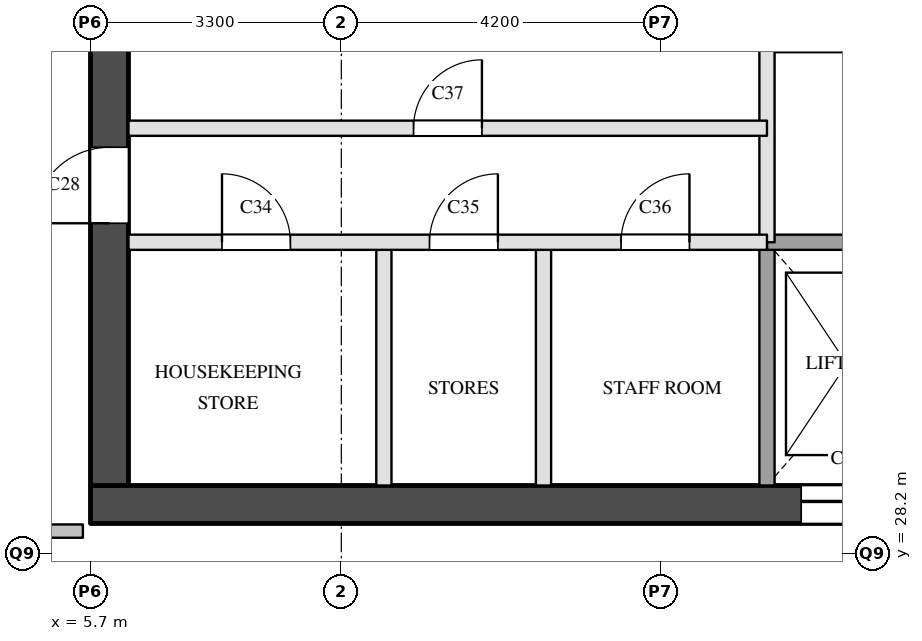
"""IFC4 building model, lengths in metres.
Left out: names, types, materials, properties, quantities, classifications, styles, units other than length and angle.
Written with IfcOpenShell. Run it as: python <this file> out.ifc"""

import sys

from ifc_helpers import new_model, si_unit, direction, frame, frame_2d, origin, place, context, subcontext, project, spatial, rectangle, extrude, element, fill, save


model = new_model("IFC4")
c1 = context("Model", 3, precision=1e-05, world=origin(), true_north=direction((0.0, 1.0)))
c2 = subcontext(c1, "Body", "Model", "MODEL_VIEW")
j1 = project(units=[si_unit("LENGTHUNIT", "METRE"), si_unit("PLANEANGLEUNIT", "RADIAN")], contexts=[c1])
p1 = place(None, origin())
s1 = spatial("IfcSite", under=j1, at=p1, CompositionType="ELEMENT")
p2 = place(p1, origin())
s2 = spatial("IfcBuilding", under=s1, at=p2, CompositionType="ELEMENT")
p3 = place(p2, frame((0.0, 0.0, 158.3)))
s3 = spatial("IfcBuildingStorey", under=s2, at=p3, CompositionType="ELEMENT", Elevation=158.3)
p4 = place(p3, frame((5.7, 28.85, 0.0), z_axis=(0.0, 0.0, 1.0), x_axis=(1.0, 0.0, 0.0)))
e1 = element("IfcWall", 1, at=p4, inside=s3, PredefinedType="SHEAR", context=c2, shape_type="SweptSolid", body=[
    extrude(rectangle(XDim=12.2, YDim=0.5, at=frame_2d((6.1, 0.0))), origin(), (0.0, 0.0, 1.0), 3.6),
])
p5 = place(p4, frame((9.35, 0.0, 0.0)))
e2 = element("IfcOpeningElement", 2, at=p5, cuts=e1, PredefinedType="OPENING", context=c2, shape_type="SweptSolid", body=[
    extrude(rectangle(XDim=1.2, YDim=2.1, at=frame_2d((0.6, 1.05))), frame((0.0, 0.26, 0.0), z_axis=(0.0, -1.0, 0.0), x_axis=(1.0, 0.0, 0.0)), (0.0, 0.0, 1.0), 0.52),
])
p6 = place(p3, frame((5.95, 29.1, 0.0), z_axis=(0.0, 0.0, 1.0), x_axis=(0.0, 1.0, 0.0)))
e3 = element("IfcWall", 3, at=p6, inside=s3, PredefinedType="SHEAR", context=c2, shape_type="SweptSolid", body=[
    extrude(rectangle(XDim=20.3, YDim=0.5, at=frame_2d((10.15, 0.0))), origin(), (0.0, 0.0, 1.0), 3.6),
])
p7 = place(p6, frame((3.45, 0.0, 0.0)))
e4 = element("IfcOpeningElement", 4, at=p7, cuts=e3, PredefinedType="OPENING", context=c2, shape_type="SweptSolid", body=[
    extrude(rectangle(XDim=1.0, YDim=2.1, at=frame_2d((0.5, 1.05))), frame((0.0, 0.26, 0.0), z_axis=(0.0, -1.0, 0.0), x_axis=(1.0, 0.0, 0.0)), (0.0, 0.0, 1.0), 0.52),
])
p8 = place(p6, frame((16.4, 0.0, 0.0)))
e5 = element("IfcOpeningElement", 5, at=p8, cuts=e3, PredefinedType="OPENING", context=c2, shape_type="SweptSolid", body=[
    extrude(rectangle(XDim=1.0, YDim=2.1, at=frame_2d((0.5, 1.05))), frame((0.0, 0.26, 0.0), z_axis=(0.0, -1.0, 0.0), x_axis=(1.0, 0.0, 0.0)), (0.0, 0.0, 1.0), 0.52),
])
for number, where, z_axis, x_axis in (
    (6, (9.56, 29.1, 0.0), (0.0, 0.0, 1.0), (0.0, 1.0, 0.0)),
    (7, (11.66, 29.1, 0.0), (0.0, 0.0, 1.0), (0.0, 1.0, 0.0)),
):
    element("IfcWall", number, at=place(p3, frame(where, z_axis=z_axis, x_axis=x_axis)), inside=s3, PredefinedType="PARTITIONING", context=c2, shape_type="SweptSolid", body=[
        extrude(rectangle(XDim=3.2, YDim=0.2, at=frame_2d((1.6, 0.0))), origin(), (0.0, 0.0, 1.0), 3.6),
    ])
p9 = place(p3, frame((14.6, 32.3, 0.0), z_axis=(0.0, 0.0, 1.0), x_axis=(0.0, 1.0, 0.0)))
e8 = element("IfcWall", 8, at=p9, inside=s3, PredefinedType="PARTITIONING", context=c2, shape_type="SweptSolid", body=[
    extrude(rectangle(XDim=2.6, YDim=0.2, at=frame_2d((1.3, 0.0))), origin(), (0.0, 0.0, 1.0), 3.6),
])
p10 = place(p3, frame((14.6, 29.1, 0.0), z_axis=(0.0, 0.0, 1.0), x_axis=(0.0, 1.0, 0.0)))
e9 = element("IfcWall", 9, at=p10, inside=s3, PredefinedType="SOLIDWALL", context=c2, shape_type="SweptSolid", body=[
    extrude(rectangle(XDim=3.2, YDim=0.2, at=frame_2d((1.6, 0.0))), origin(), (0.0, 0.0, 1.0), 3.6),
])
p11 = place(p3, frame((6.2, 32.3, 0.0), z_axis=(0.0, 0.0, 1.0), x_axis=(1.0, 0.0, 0.0)))
e10 = element("IfcWall", 10, at=p11, inside=s3, PredefinedType="PARTITIONING", context=c2, shape_type="SweptSolid", body=[
    extrude(rectangle(XDim=8.4, YDim=0.2, at=frame_2d((4.2, 0.0))), origin(), (0.0, 0.0, 1.0), 3.6),
])
p12 = place(p11, frame((1.23, 0.0, 0.0)))
e11 = element("IfcOpeningElement", 11, at=p12, cuts=e10, PredefinedType="OPENING", context=c2, shape_type="SweptSolid", body=[
    extrude(rectangle(XDim=0.9, YDim=2.1, at=frame_2d((0.45, 1.05))), frame((0.0, 0.11, 0.0), z_axis=(0.0, -1.0, 0.0), x_axis=(1.0, 0.0, 0.0)), (0.0, 0.0, 1.0), 0.22),
])
p13 = place(p11, frame((3.96, 0.0, 0.0)))
e12 = element("IfcOpeningElement", 12, at=p13, cuts=e10, PredefinedType="OPENING", context=c2, shape_type="SweptSolid", body=[
    extrude(rectangle(XDim=0.9, YDim=2.1, at=frame_2d((0.45, 1.05))), frame((0.0, 0.11, 0.0), z_axis=(0.0, -1.0, 0.0), x_axis=(1.0, 0.0, 0.0)), (0.0, 0.0, 1.0), 0.22),
])
p14 = place(p11, frame((6.48, 0.0, 0.0)))
e13 = element("IfcOpeningElement", 13, at=p14, cuts=e10, PredefinedType="OPENING", context=c2, shape_type="SweptSolid", body=[
    extrude(rectangle(XDim=0.9, YDim=2.1, at=frame_2d((0.45, 1.05))), frame((0.0, 0.11, 0.0), z_axis=(0.0, -1.0, 0.0), x_axis=(1.0, 0.0, 0.0)), (0.0, 0.0, 1.0), 0.22),
])
p15 = place(p3, frame((14.6, 32.3, 0.0), z_axis=(0.0, 0.0, 1.0), x_axis=(1.0, 0.0, 0.0)))
e14 = element("IfcWall", 14, at=p15, inside=s3, PredefinedType="SOLIDWALL", context=c2, shape_type="SweptSolid", body=[
    extrude(rectangle(XDim=2.8, YDim=0.2, at=frame_2d((1.4, 0.0))), origin(), (0.0, 0.0, 1.0), 3.6),
])
p16 = place(p3, frame((6.2, 33.8, 0.0), z_axis=(0.0, 0.0, 1.0), x_axis=(1.0, 0.0, 0.0)))
e15 = element("IfcWall", 15, at=p16, inside=s3, PredefinedType="PARTITIONING", context=c2, shape_type="SweptSolid", body=[
    extrude(rectangle(XDim=8.4, YDim=0.2, at=frame_2d((4.2, 0.0))), origin(), (0.0, 0.0, 1.0), 3.6),
])
p17 = place(p16, frame((3.75, 0.0, 0.0)))
e16 = element("IfcOpeningElement", 16, at=p17, cuts=e15, PredefinedType="OPENING", context=c2, shape_type="SweptSolid", body=[
    extrude(rectangle(XDim=0.9, YDim=2.1, at=frame_2d((0.45, 1.05))), frame((0.0, 0.11, 0.0), z_axis=(0.0, -1.0, 0.0), x_axis=(1.0, 0.0, 0.0)), (0.0, 0.0, 1.0), 0.22),
])
p18 = place(p3, frame((14.6, 34.9, 0.0), z_axis=(0.0, 0.0, 1.0), x_axis=(1.0, 0.0, 0.0)))
e17 = element("IfcWall", 17, at=p18, inside=s3, PredefinedType="SOLIDWALL", context=c2, shape_type="SweptSolid", body=[
    extrude(rectangle(XDim=2.8, YDim=0.2, at=frame_2d((1.4, 0.0))), origin(), (0.0, 0.0, 1.0), 3.6),
])
p19 = place(p3, frame((4.1, 28.5, 0.0), z_axis=(0.0, 0.0, 1.0), x_axis=(1.0, 0.0, 0.0)))
e18 = element("IfcWall", 18, at=p19, inside=s3, PredefinedType="PARTITIONING", context=c2, shape_type="SweptSolid", body=[
    extrude(rectangle(XDim=1.5, YDim=0.175, at=frame_2d((0.75, 0.0))), origin(), (0.0, 0.0, 1.0), 3.6),
])
p20 = place(p5, origin())
e19 = element("IfcDoor", 19, at=p20, inside=s3, OperationType="SLIDING_TO_LEFT", PredefinedType="DOOR", context=c2, shape_type="SweptSolid", body=[
    extrude(rectangle(XDim=1.2, YDim=2.1, at=frame_2d((0.6, 1.05))), frame((0.0, 0.025, 0.0), z_axis=(0.0, -1.0, 0.0), x_axis=(1.0, 0.0, 0.0)), (0.0, 0.0, 1.0), 0.05),
])
fill(e2, e19)
p21 = place(p7, origin())
e20 = element("IfcDoor", 20, at=p21, inside=s3, OperationType="SINGLE_SWING_LEFT", PredefinedType="DOOR", context=c2, shape_type="SweptSolid", body=[
    extrude(rectangle(XDim=1.0, YDim=2.1, at=frame_2d((0.5, 1.05))), frame((0.0, 0.025, 0.0), z_axis=(0.0, -1.0, 0.0), x_axis=(1.0, 0.0, 0.0)), (0.0, 0.0, 1.0), 0.05),
])
fill(e4, e20)
p22 = place(p12, origin())
e21 = element("IfcDoor", 21, at=p22, inside=s3, OperationType="SINGLE_SWING_LEFT", PredefinedType="DOOR", context=c2, shape_type="SweptSolid", body=[
    extrude(rectangle(XDim=0.9, YDim=2.1, at=frame_2d((0.45, 1.05))), frame((0.0, 0.025, 0.0), z_axis=(0.0, -1.0, 0.0), x_axis=(1.0, 0.0, 0.0)), (0.0, 0.0, 1.0), 0.05),
])
fill(e11, e21)
p23 = place(p13, origin())
e22 = element("IfcDoor", 22, at=p23, inside=s3, OperationType="SINGLE_SWING_RIGHT", PredefinedType="DOOR", context=c2, shape_type="SweptSolid", body=[
    extrude(rectangle(XDim=0.9, YDim=2.1, at=frame_2d((0.45, 1.05))), frame((0.0, 0.025, 0.0), z_axis=(0.0, -1.0, 0.0), x_axis=(1.0, 0.0, 0.0)), (0.0, 0.0, 1.0), 0.05),
])
fill(e12, e22)
p24 = place(p14, origin())
e23 = element("IfcDoor", 23, at=p24, inside=s3, OperationType="SINGLE_SWING_RIGHT", PredefinedType="DOOR", context=c2, shape_type="SweptSolid", body=[
    extrude(rectangle(XDim=0.9, YDim=2.1, at=frame_2d((0.45, 1.05))), frame((0.0, 0.025, 0.0), z_axis=(0.0, -1.0, 0.0), x_axis=(1.0, 0.0, 0.0)), (0.0, 0.0, 1.0), 0.05),
])
fill(e13, e23)
p25 = place(p17, origin())
e24 = element("IfcDoor", 24, at=p25, inside=s3, OperationType="SINGLE_SWING_RIGHT", PredefinedType="DOOR", context=c2, shape_type="SweptSolid", body=[
    extrude(rectangle(XDim=0.9, YDim=2.1, at=frame_2d((0.45, 1.05))), frame((0.0, 0.025, 0.0), z_axis=(0.0, -1.0, 0.0), x_axis=(1.0, 0.0, 0.0)), (0.0, 0.0, 1.0), 0.05),
])
fill(e16, e24)
save(model, sys.argv[1])
